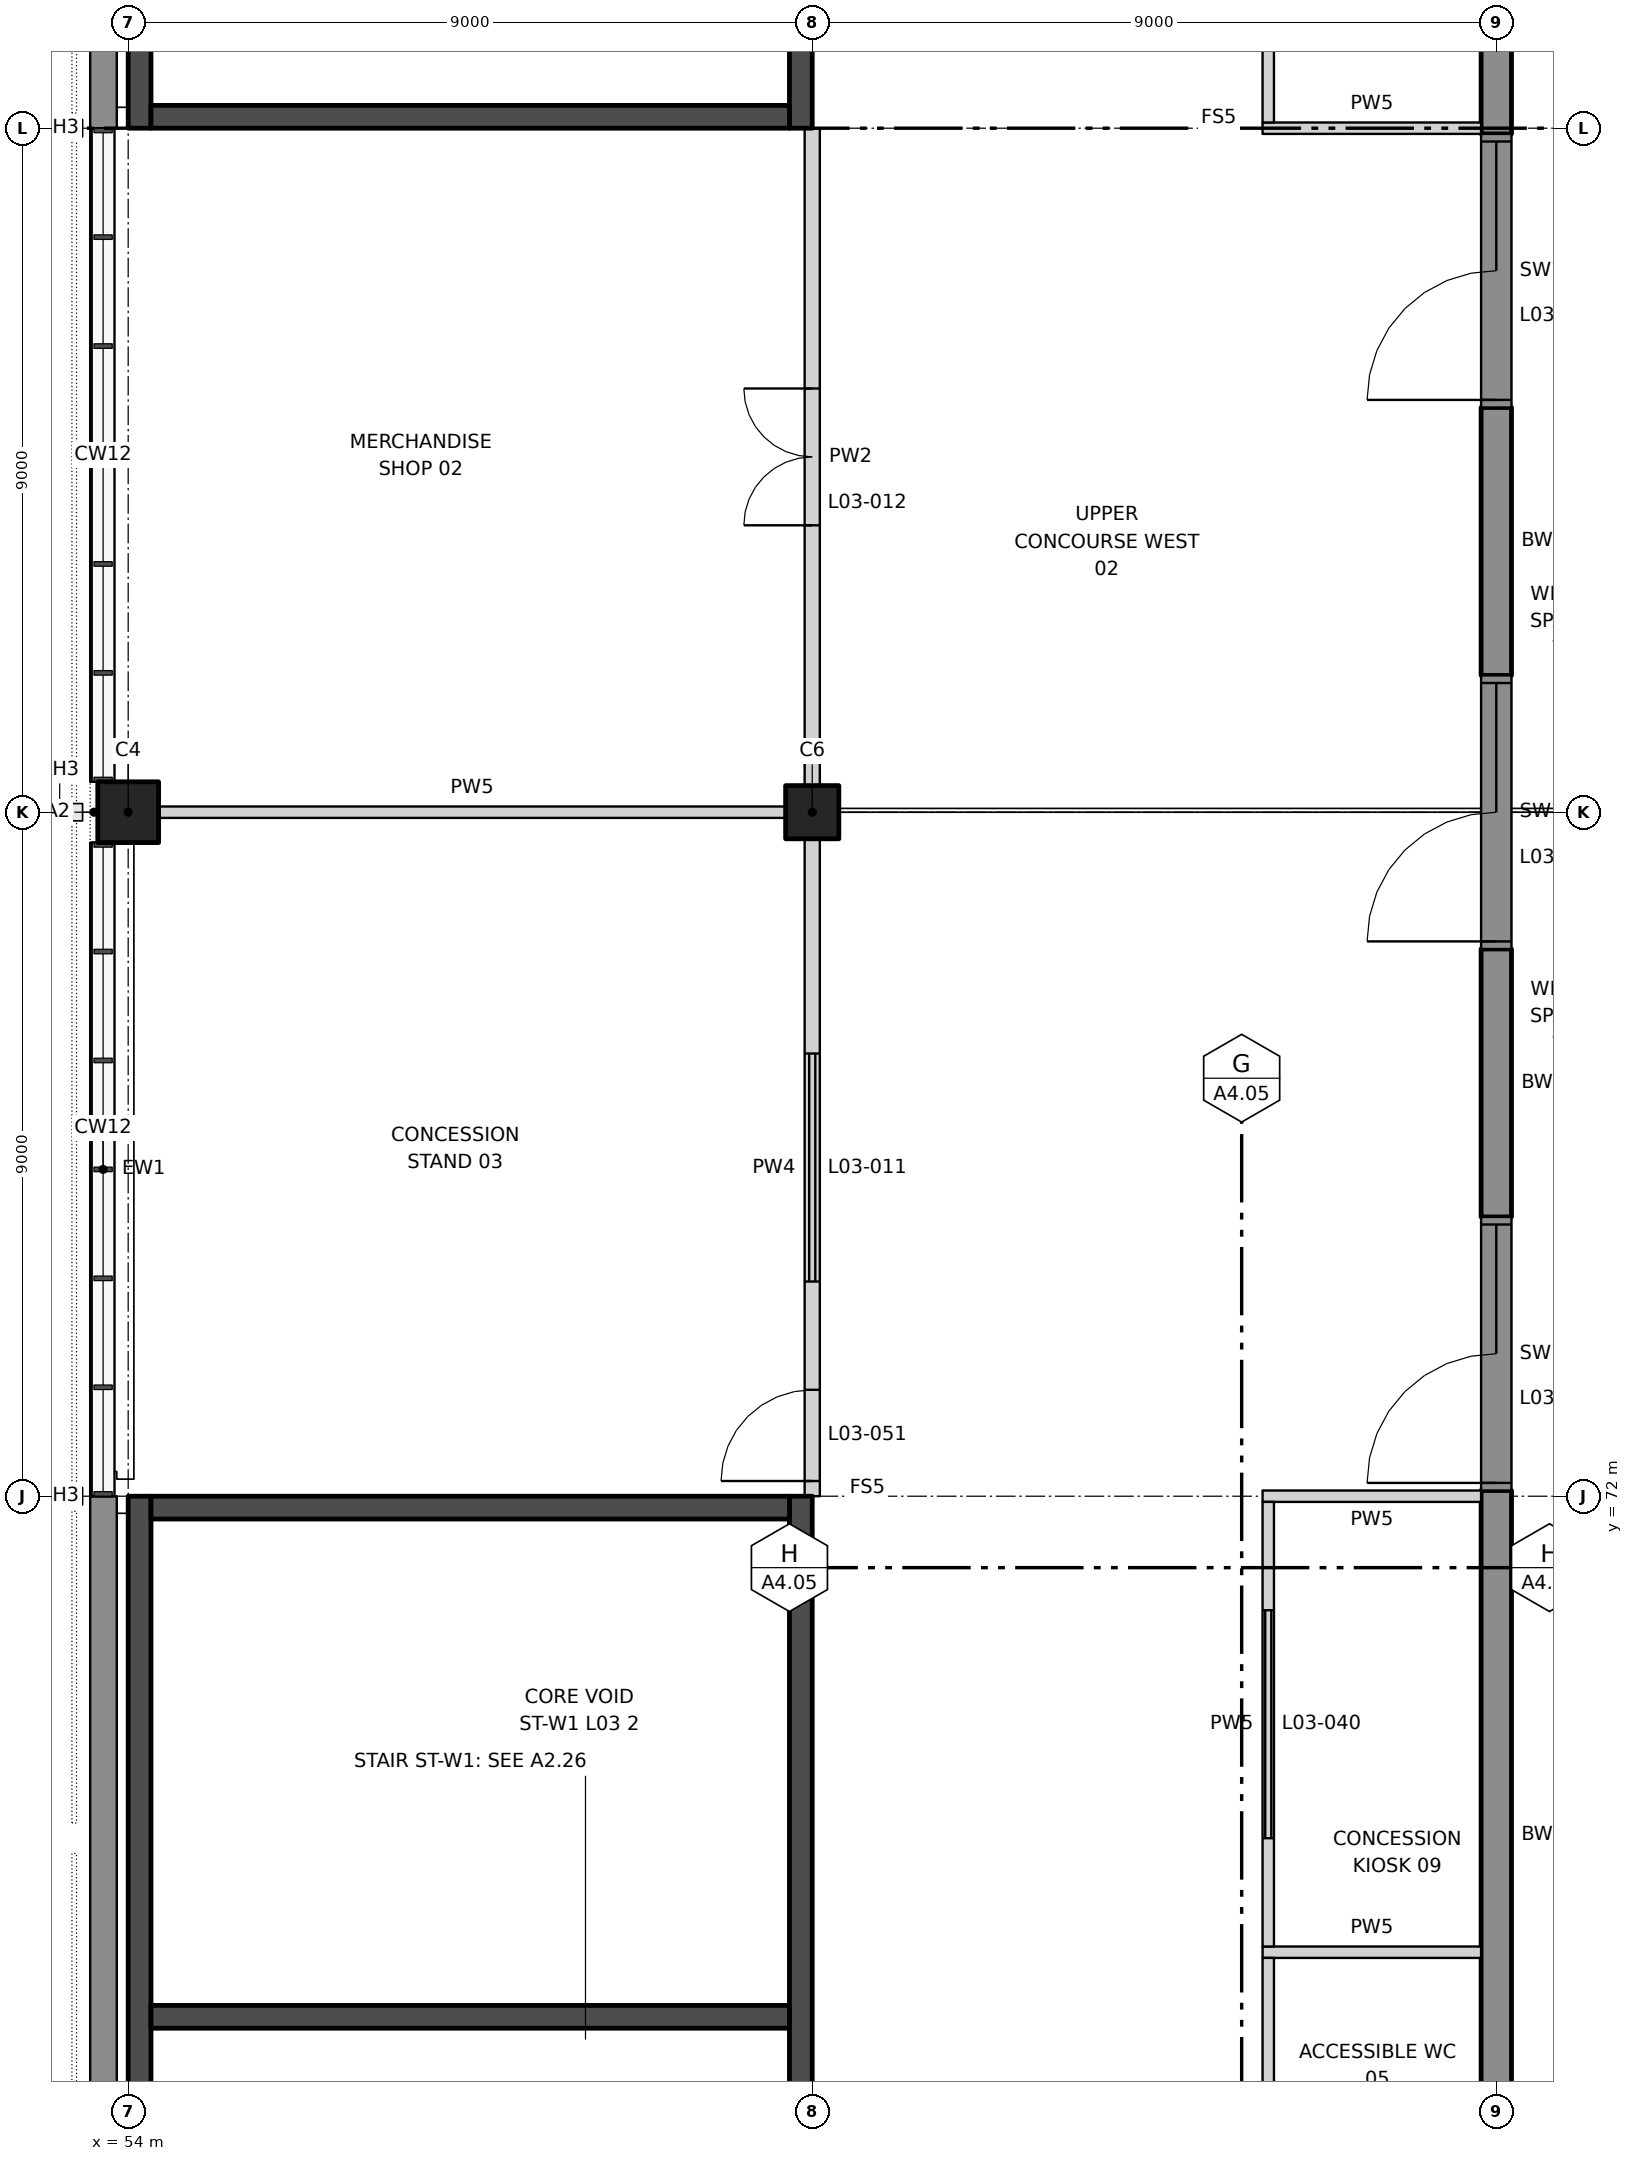
"""IFC4 building model, lengths in metres.
Left out: names, types, materials, properties, quantities, classifications, styles, units other than length and angle.
Written with IfcOpenShell. Run it as: python <this file> out.ifc"""

import sys

from ifc_helpers import new_model, si_unit, direction, frame, frame_2d, origin, origin_2d, place, context, subcontext, project, spatial, rectangle, extrude, element, fill, save


model = new_model("IFC4")
c1 = context("Model", 3, precision=1e-05, world=origin(), true_north=direction((0.0, 1.0)))
c2 = subcontext(c1, "Body", "Model", "MODEL_VIEW")
j1 = project(units=[si_unit("LENGTHUNIT", "METRE"), si_unit("PLANEANGLEUNIT", "RADIAN")], contexts=[c1])
p1 = place(None, origin())
s1 = spatial("IfcSite", under=j1, at=p1, CompositionType="ELEMENT")
p2 = place(p1, origin())
s2 = spatial("IfcBuilding", under=s1, at=p2, CompositionType="ELEMENT")
p3 = place(p2, frame((0.0, 0.0, 22.0)))
s3 = spatial("IfcBuildingStorey", under=s2, at=p3, CompositionType="ELEMENT", Elevation=22.0)
p4 = place(p3, frame((54.0, 81.0, 0.0), z_axis=(0.0, 0.0, 1.0), x_axis=(1.0, 0.0, 0.0)))
e1 = element("IfcColumn", 1, at=p4, inside=s3, PredefinedType="COLUMN", context=c2, shape_type="SweptSolid", body=[
    extrude(rectangle(XDim=0.8, YDim=0.8, at=origin_2d()), origin(), (0.0, 0.0, 1.0), 6.0),
])
p5 = place(p3, frame((63.0, 81.0, 0.0), z_axis=(0.0, 0.0, 1.0), x_axis=(1.0, 0.0, 0.0)))
e2 = element("IfcColumn", 2, at=p5, inside=s3, PredefinedType="COLUMN", context=c2, shape_type="SweptSolid", body=[
    extrude(rectangle(XDim=0.7, YDim=0.7, at=origin_2d()), origin(), (0.0, 0.0, 1.0), 6.0),
])
p6 = place(p3, frame((72.0, 99.0, 0.0), z_axis=(0.0, 0.0, 1.0), x_axis=(0.0, -1.0, 0.0)))
e3 = element("IfcWall", 3, at=p6, inside=s3, PredefinedType="SOLIDWALL", context=c2, shape_type="SweptSolid", body=[
    extrude(rectangle(XDim=9.075, YDim=0.4, at=frame_2d((4.538, 0.0))), origin(), (0.0, 0.0, 1.0), 6.0),
])
for number, where, z_axis, x_axis in (
    (4, (72.0, 86.325, 0.0), (0.0, 0.0, 1.0), (0.0, -1.0, 0.0)),
    (5, (72.0, 79.2, 0.0), (0.0, 0.0, 1.0), (0.0, -1.0, 0.0)),
):
    element("IfcWall", number, at=place(p3, frame(where, z_axis=z_axis, x_axis=x_axis)), inside=s3, PredefinedType="SOLIDWALL", context=c2, shape_type="SweptSolid", body=[
        extrude(rectangle(XDim=3.525, YDim=0.4, at=frame_2d((1.762, 0.0))), origin(), (0.0, 0.0, 1.0), 6.0),
    ])
p7 = place(p3, frame((72.0, 72.075, 0.0), z_axis=(0.0, 0.0, 1.0), x_axis=(0.0, -1.0, 0.0)))
e6 = element("IfcWall", 6, at=p7, inside=s3, PredefinedType="SOLIDWALL", context=c2, shape_type="SweptSolid", body=[
    extrude(rectangle(XDim=9.075, YDim=0.4, at=frame_2d((4.538, 0.0))), origin(), (0.0, 0.0, 1.0), 6.0),
])
p8 = place(p3, frame((68.925, 66.0, 0.0), z_axis=(0.0, 0.0, 1.0), x_axis=(1.0, 0.0, 0.0)))
e7 = element("IfcWall", 7, at=p8, inside=s3, PredefinedType="PARTITIONING", context=c2, shape_type="SweptSolid", body=[
    extrude(rectangle(XDim=2.875, YDim=0.15, at=frame_2d((1.438, 0.0))), origin(), (0.0, 0.0, 1.0), 6.0),
])
p9 = place(p3, frame((68.925, 72.0, 0.0), z_axis=(0.0, 0.0, 1.0), x_axis=(1.0, 0.0, 0.0)))
e8 = element("IfcWall", 8, at=p9, inside=s3, PredefinedType="PARTITIONING", context=c2, shape_type="SweptSolid", body=[
    extrude(rectangle(XDim=2.875, YDim=0.15, at=frame_2d((1.438, 0.0))), origin(), (0.0, 0.0, 1.0), 4.7),
])
p10 = place(p3, frame((54.4, 81.0, 0.0), z_axis=(0.0, 0.0, 1.0), x_axis=(1.0, 0.0, 0.0)))
e9 = element("IfcWall", 9, at=p10, inside=s3, PredefinedType="PARTITIONING", context=c2, shape_type="SweptSolid", body=[
    extrude(rectangle(XDim=8.25, YDim=0.15, at=frame_2d((4.125, 0.0))), origin(), (0.0, 0.0, 1.0), 4.8),
])
p11 = place(p3, frame((68.925, 90.0, 0.0), z_axis=(0.0, 0.0, 1.0), x_axis=(1.0, 0.0, 0.0)))
e10 = element("IfcWall", 10, at=p11, inside=s3, PredefinedType="PARTITIONING", context=c2, shape_type="SweptSolid", body=[
    extrude(rectangle(XDim=2.875, YDim=0.15, at=frame_2d((1.438, 0.0))), origin(), (0.0, 0.0, 1.0), 4.7),
])
p12 = place(p3, frame((63.0, 72.0, 0.0), z_axis=(0.0, 0.0, 1.0), x_axis=(0.0, 1.0, 0.0)))
e11 = element("IfcWall", 11, at=p12, inside=s3, PredefinedType="PARTITIONING", context=c2, shape_type="SweptSolid", body=[
    extrude(rectangle(XDim=8.65, YDim=0.2, at=frame_2d((4.325, 0.0))), origin(), (0.0, 0.0, 1.0), 4.7),
])
p13 = place(p12, frame((2.825, 0.0, 0.0)))
e12 = element("IfcOpeningElement", 12, at=p13, cuts=e11, PredefinedType="OPENING", context=c2, shape_type="SweptSolid", body=[
    extrude(rectangle(XDim=3.0, YDim=2.4, at=frame_2d((1.5, 1.2))), frame((0.0, 0.11, 0.0), z_axis=(0.0, -1.0, 0.0), x_axis=(1.0, 0.0, 0.0)), (0.0, 0.0, 1.0), 0.22),
])
p14 = place(p12, frame((0.2, 0.0, 0.0)))
e13 = element("IfcOpeningElement", 13, at=p14, cuts=e11, PredefinedType="OPENING", context=c2, shape_type="SweptSolid", body=[
    extrude(rectangle(XDim=1.2, YDim=2.1, at=frame_2d((0.6, 1.05))), frame((0.0, 0.11, 0.0), z_axis=(0.0, -1.0, 0.0), x_axis=(1.0, 0.0, 0.0)), (0.0, 0.0, 1.0), 0.22),
])
p15 = place(p3, frame((63.0, 81.35, 0.0), z_axis=(0.0, 0.0, 1.0), x_axis=(0.0, 1.0, 0.0)))
e14 = element("IfcWall", 14, at=p15, inside=s3, PredefinedType="PARTITIONING", context=c2, shape_type="SweptSolid", body=[
    extrude(rectangle(XDim=8.65, YDim=0.2, at=frame_2d((4.325, 0.0))), origin(), (0.0, 0.0, 1.0), 4.7),
])
p16 = place(p15, frame((3.425, 0.0, 0.0)))
e15 = element("IfcOpeningElement", 15, at=p16, cuts=e14, PredefinedType="OPENING", context=c2, shape_type="SweptSolid", body=[
    extrude(rectangle(XDim=1.8, YDim=2.1, at=frame_2d((0.9, 1.05))), frame((0.0, 0.11, 0.0), z_axis=(0.0, -1.0, 0.0), x_axis=(1.0, 0.0, 0.0)), (0.0, 0.0, 1.0), 0.22),
])
p17 = place(p3, frame((69.0, 63.075, 0.0), z_axis=(0.0, 0.0, 1.0), x_axis=(0.0, 1.0, 0.0)))
e16 = element("IfcWall", 16, at=p17, inside=s3, PredefinedType="PARTITIONING", context=c2, shape_type="SweptSolid", body=[
    extrude(rectangle(XDim=2.85, YDim=0.15, at=frame_2d((1.425, 0.0))), origin(), (0.0, 0.0, 1.0), 6.0),
])
p18 = place(p3, frame((69.0, 66.075, 0.0), z_axis=(0.0, 0.0, 1.0), x_axis=(0.0, 1.0, 0.0)))
e17 = element("IfcWall", 17, at=p18, inside=s3, PredefinedType="PARTITIONING", context=c2, shape_type="SweptSolid", body=[
    extrude(rectangle(XDim=5.85, YDim=0.15, at=frame_2d((2.925, 0.0))), origin(), (0.0, 0.0, 1.0), 6.0),
])
p19 = place(p18, frame((1.425, 0.0, 0.0)))
e18 = element("IfcOpeningElement", 18, at=p19, cuts=e17, PredefinedType="OPENING", context=c2, shape_type="SweptSolid", body=[
    extrude(rectangle(XDim=3.0, YDim=2.4, at=frame_2d((1.5, 1.2))), frame((0.0, 0.085, 0.0), z_axis=(0.0, -1.0, 0.0), x_axis=(1.0, 0.0, 0.0)), (0.0, 0.0, 1.0), 0.17),
])
p20 = place(p3, frame((69.0, 90.075, 0.0), z_axis=(0.0, 0.0, 1.0), x_axis=(0.0, 1.0, 0.0)))
e19 = element("IfcWall", 19, at=p20, inside=s3, PredefinedType="PARTITIONING", context=c2, shape_type="SweptSolid", body=[
    extrude(rectangle(XDim=5.85, YDim=0.15, at=frame_2d((2.925, 0.0))), origin(), (0.0, 0.0, 1.0), 6.0),
])
p21 = place(p20, frame((1.425, 0.0, 0.0)))
e20 = element("IfcOpeningElement", 20, at=p21, cuts=e19, PredefinedType="OPENING", context=c2, shape_type="SweptSolid", body=[
    extrude(rectangle(XDim=3.0, YDim=2.4, at=frame_2d((1.5, 1.2))), frame((0.0, 0.085, 0.0), z_axis=(0.0, -1.0, 0.0), x_axis=(1.0, 0.0, 0.0)), (0.0, 0.0, 1.0), 0.17),
])
p22 = place(p3, frame((53.675, 72.0, 0.0), z_axis=(0.0, 0.0, 1.0), x_axis=(0.0, -1.0, 0.0)))
e21 = element("IfcWall", 21, at=p22, inside=s3, PredefinedType="SOLIDWALL", context=c2, shape_type="SweptSolid", body=[
    extrude(rectangle(XDim=9.0, YDim=0.35, at=frame_2d((4.5, 0.0))), origin(), (0.0, 0.0, 1.0), 6.0),
])
for number, where, z_axis, x_axis in (
    (22, (53.65, 80.6, 0.0), (0.0, 0.0, 1.0), (0.0, -1.0, 0.0)),
    (23, (53.65, 90.0, 0.0), (0.0, 0.0, 1.0), (0.0, -1.0, 0.0)),
):
    element("IfcWall", number, at=place(p3, frame(where, z_axis=z_axis, x_axis=x_axis)), inside=s3, PredefinedType="SOLIDWALL", context=c2, shape_type="SweptSolid", body=[
        extrude(rectangle(XDim=8.6, YDim=0.3, at=frame_2d((4.3, 0.0))), origin(), (0.0, 0.0, 1.0), 1.0),
    ])
p23 = place(p3, frame((53.675, 99.0, 0.0), z_axis=(0.0, 0.0, 1.0), x_axis=(0.0, -1.0, 0.0)))
e24 = element("IfcWall", 24, at=p23, inside=s3, PredefinedType="SOLIDWALL", context=c2, shape_type="SweptSolid", body=[
    extrude(rectangle(XDim=9.0, YDim=0.35, at=frame_2d((4.5, 0.0))), origin(), (0.0, 0.0, 1.0), 6.0),
])
p24 = place(p3, frame((62.85, 54.0, 0.0), z_axis=(0.0, 0.0, 1.0), x_axis=(0.0, 1.0, 0.0)))
e25 = element("IfcWall", 25, at=p24, inside=s3, PredefinedType="SHEAR", context=c2, shape_type="SweptSolid", body=[
    extrude(rectangle(XDim=18.0, YDim=0.3, at=frame_2d((9.0, 0.0))), origin(), (0.0, 0.0, 1.0), 6.0),
])
p25 = place(p24, frame((8.6, 0.0, 0.0)))
e26 = element("IfcOpeningElement", 26, at=p25, cuts=e25, PredefinedType="OPENING", context=c2, shape_type="SweptSolid", body=[
    extrude(rectangle(XDim=1.2, YDim=2.1, at=frame_2d((0.6, 1.05))), frame((0.0, 0.16, 0.0), z_axis=(0.0, -1.0, 0.0), x_axis=(1.0, 0.0, 0.0)), (0.0, 0.0, 1.0), 0.32),
])
p26 = place(p3, frame((54.15, 54.0, 0.0), z_axis=(0.0, 0.0, 1.0), x_axis=(0.0, 1.0, 0.0)))
e27 = element("IfcWall", 27, at=p26, inside=s3, PredefinedType="SHEAR", context=c2, shape_type="SweptSolid", body=[
    extrude(rectangle(XDim=18.0, YDim=0.3, at=frame_2d((9.0, 0.0))), origin(), (0.0, 0.0, 1.0), 6.0),
])
for number, where, z_axis, x_axis in (
    (28, (62.7, 71.85, 0.0), (0.0, 0.0, 1.0), (-1.0, 0.0, 0.0)),
    (29, (62.7, 65.15, 0.0), (0.0, 0.0, 1.0), (-1.0, 0.0, 0.0)),
):
    element("IfcWall", number, at=place(p3, frame(where, z_axis=z_axis, x_axis=x_axis)), inside=s3, PredefinedType="SHEAR", context=c2, shape_type="SweptSolid", body=[
        extrude(rectangle(XDim=8.4, YDim=0.3, at=frame_2d((4.2, 0.0))), origin(), (0.0, 0.0, 1.0), 6.0),
    ])
p27 = place(p3, frame((62.85, 108.0, 0.0), z_axis=(0.0, 0.0, 1.0), x_axis=(0.0, -1.0, 0.0)))
e30 = element("IfcWall", 30, at=p27, inside=s3, PredefinedType="SHEAR", context=c2, shape_type="SweptSolid", body=[
    extrude(rectangle(XDim=18.0, YDim=0.3, at=frame_2d((9.0, 0.0))), origin(), (0.0, 0.0, 1.0), 6.0),
])
p28 = place(p27, frame((8.6, 0.0, 0.0)))
e31 = element("IfcOpeningElement", 31, at=p28, cuts=e30, PredefinedType="OPENING", context=c2, shape_type="SweptSolid", body=[
    extrude(rectangle(XDim=1.2, YDim=2.1, at=frame_2d((0.6, 1.05))), frame((0.0, 0.16, 0.0), z_axis=(0.0, -1.0, 0.0), x_axis=(1.0, 0.0, 0.0)), (0.0, 0.0, 1.0), 0.32),
])
p29 = place(p3, frame((54.15, 108.0, 0.0), z_axis=(0.0, 0.0, 1.0), x_axis=(0.0, -1.0, 0.0)))
e32 = element("IfcWall", 32, at=p29, inside=s3, PredefinedType="SHEAR", context=c2, shape_type="SweptSolid", body=[
    extrude(rectangle(XDim=18.0, YDim=0.3, at=frame_2d((9.0, 0.0))), origin(), (0.0, 0.0, 1.0), 6.0),
])
p30 = place(p3, frame((62.7, 90.15, 0.0), z_axis=(0.0, 0.0, 1.0), x_axis=(-1.0, 0.0, 0.0)))
e33 = element("IfcWall", 33, at=p30, inside=s3, PredefinedType="SHEAR", context=c2, shape_type="SweptSolid", body=[
    extrude(rectangle(XDim=8.4, YDim=0.3, at=frame_2d((4.2, 0.0))), origin(), (0.0, 0.0, 1.0), 6.0),
])
p31 = place(p3, frame((72.0, 79.2, 0.0), z_axis=(0.0, 0.0, 1.0), x_axis=(0.0, 1.0, 0.0)))
e34 = element("IfcWall", 34, at=p31, inside=s3, PredefinedType="SOLIDWALL", context=c2, shape_type="SweptSolid", body=[
    extrude(rectangle(XDim=3.6, YDim=0.4, at=frame_2d((1.8, 0.0))), origin(), (0.0, 0.0, 1.0), 3.0),
])
p32 = place(p31, frame((0.1, 0.0, 0.0)))
e35 = element("IfcOpeningElement", 35, at=p32, cuts=e34, PredefinedType="OPENING", context=c2, shape_type="SweptSolid", body=[
    extrude(rectangle(XDim=3.4, YDim=2.4, at=frame_2d((1.7, 1.2))), frame((0.0, 0.21, 0.0), z_axis=(0.0, -1.0, 0.0), x_axis=(1.0, 0.0, 0.0)), (0.0, 0.0, 1.0), 0.42),
])
p33 = place(p3, frame((72.0, 72.075, 0.0), z_axis=(0.0, 0.0, 1.0), x_axis=(0.0, 1.0, 0.0)))
e36 = element("IfcWall", 36, at=p33, inside=s3, PredefinedType="SOLIDWALL", context=c2, shape_type="SweptSolid", body=[
    extrude(rectangle(XDim=3.6, YDim=0.4, at=frame_2d((1.8, 0.0))), origin(), (0.0, 0.0, 1.0), 3.0),
])
p34 = place(p33, frame((0.1, 0.0, 0.0)))
e37 = element("IfcOpeningElement", 37, at=p34, cuts=e36, PredefinedType="OPENING", context=c2, shape_type="SweptSolid", body=[
    extrude(rectangle(XDim=3.4, YDim=2.4, at=frame_2d((1.7, 1.2))), frame((0.0, 0.21, 0.0), z_axis=(0.0, -1.0, 0.0), x_axis=(1.0, 0.0, 0.0)), (0.0, 0.0, 1.0), 0.42),
])
p35 = place(p3, frame((72.0, 86.325, 0.0), z_axis=(0.0, 0.0, 1.0), x_axis=(0.0, 1.0, 0.0)))
e38 = element("IfcWall", 38, at=p35, inside=s3, PredefinedType="SOLIDWALL", context=c2, shape_type="SweptSolid", body=[
    extrude(rectangle(XDim=3.6, YDim=0.4, at=frame_2d((1.8, 0.0))), origin(), (0.0, 0.0, 1.0), 3.0),
])
p36 = place(p35, frame((0.1, 0.0, 0.0)))
e39 = element("IfcOpeningElement", 39, at=p36, cuts=e38, PredefinedType="OPENING", context=c2, shape_type="SweptSolid", body=[
    extrude(rectangle(XDim=3.4, YDim=2.4, at=frame_2d((1.7, 1.2))), frame((0.0, 0.21, 0.0), z_axis=(0.0, -1.0, 0.0), x_axis=(1.0, 0.0, 0.0)), (0.0, 0.0, 1.0), 0.42),
])
p37 = place(p13, origin())
e40 = element("IfcDoor", 40, at=p37, inside=s3, OperationType="ROLLINGUP", PredefinedType="DOOR", context=c2, shape_type="SweptSolid", body=[
    extrude(rectangle(XDim=3.0, YDim=2.4, at=frame_2d((1.5, 1.2))), frame((0.0, 0.025, 0.0), z_axis=(0.0, -1.0, 0.0), x_axis=(1.0, 0.0, 0.0)), (0.0, 0.0, 1.0), 0.05),
])
fill(e12, e40)
p38 = place(p16, origin())
e41 = element("IfcDoor", 41, at=p38, inside=s3, OperationType="DOUBLE_DOOR_DOUBLE_SWING", PredefinedType="DOOR", context=c2, shape_type="SweptSolid", body=[
    extrude(rectangle(XDim=1.8, YDim=2.1, at=frame_2d((0.9, 1.05))), frame((0.0, 0.025, 0.0), z_axis=(0.0, -1.0, 0.0), x_axis=(1.0, 0.0, 0.0)), (0.0, 0.0, 1.0), 0.05),
])
fill(e15, e41)
p39 = place(p19, origin())
e42 = element("IfcDoor", 42, at=p39, inside=s3, OperationType="ROLLINGUP", PredefinedType="DOOR", context=c2, shape_type="SweptSolid", body=[
    extrude(rectangle(XDim=3.0, YDim=2.4, at=frame_2d((1.5, 1.2))), frame((0.0, 0.025, 0.0), z_axis=(0.0, -1.0, 0.0), x_axis=(1.0, 0.0, 0.0)), (0.0, 0.0, 1.0), 0.05),
])
fill(e18, e42)
p40 = place(p14, origin())
e43 = element("IfcDoor", 43, at=p40, inside=s3, OperationType="SINGLE_SWING_LEFT", PredefinedType="DOOR", context=c2, shape_type="SweptSolid", body=[
    extrude(rectangle(XDim=1.2, YDim=2.1, at=frame_2d((0.6, 1.05))), frame((0.0, 0.025, 0.0), z_axis=(0.0, -1.0, 0.0), x_axis=(1.0, 0.0, 0.0)), (0.0, 0.0, 1.0), 0.05),
])
fill(e13, e43)
p41 = place(p32, origin())
e44 = element("IfcDoor", 44, at=p41, inside=s3, OperationType="DOUBLE_DOOR_SINGLE_SWING", PredefinedType="DOOR", context=c2, shape_type="SweptSolid", body=[
    extrude(rectangle(XDim=3.4, YDim=2.4, at=frame_2d((1.7, 1.2))), frame((0.0, 0.025, 0.0), z_axis=(0.0, -1.0, 0.0), x_axis=(1.0, 0.0, 0.0)), (0.0, 0.0, 1.0), 0.05),
])
fill(e35, e44)
p42 = place(p34, origin())
e45 = element("IfcDoor", 45, at=p42, inside=s3, OperationType="DOUBLE_DOOR_SINGLE_SWING", PredefinedType="DOOR", context=c2, shape_type="SweptSolid", body=[
    extrude(rectangle(XDim=3.4, YDim=2.4, at=frame_2d((1.7, 1.2))), frame((0.0, 0.025, 0.0), z_axis=(0.0, -1.0, 0.0), x_axis=(1.0, 0.0, 0.0)), (0.0, 0.0, 1.0), 0.05),
])
fill(e37, e45)
p43 = place(p36, origin())
e46 = element("IfcDoor", 46, at=p43, inside=s3, OperationType="DOUBLE_DOOR_SINGLE_SWING", PredefinedType="DOOR", context=c2, shape_type="SweptSolid", body=[
    extrude(rectangle(XDim=3.4, YDim=2.4, at=frame_2d((1.7, 1.2))), frame((0.0, 0.025, 0.0), z_axis=(0.0, -1.0, 0.0), x_axis=(1.0, 0.0, 0.0)), (0.0, 0.0, 1.0), 0.05),
])
fill(e39, e46)
save(model, sys.argv[1])
